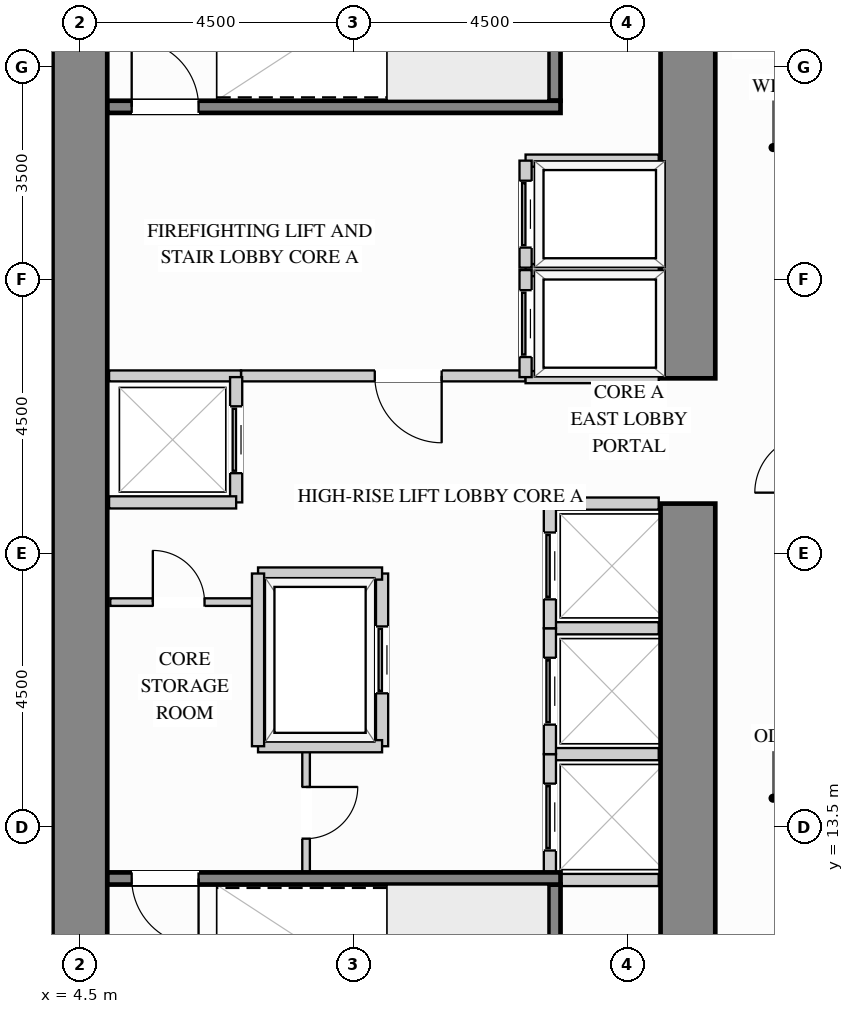
"""IFC4 building model, lengths in metres.
Left out: names, types, materials, properties, quantities, classifications, styles, units other than length and angle.
Written with IfcOpenShell. Run it as: python <this file> out.ifc"""

import sys

from ifc_helpers import new_model, si_unit, direction, frame, frame_2d, origin, place, context, subcontext, project, spatial, rectangle, extrude, source, transform, mapped, element, fill, save


model = new_model("IFC4")
c1 = context("Model", 3, precision=1e-05, world=origin(), true_north=direction((0.0, 1.0)))
c2 = subcontext(c1, "Body", "Model", "MODEL_VIEW")
j1 = project(units=[si_unit("LENGTHUNIT", "METRE"), si_unit("PLANEANGLEUNIT", "RADIAN")], contexts=[c1])
p1 = place(None, origin())
s1 = spatial("IfcSite", under=j1, at=p1, CompositionType="ELEMENT")
p2 = place(p1, origin())
s2 = spatial("IfcBuilding", under=s1, at=p2, CompositionType="ELEMENT")
p3 = place(p2, frame((0.0, 0.0, 51.3)))
s3 = spatial("IfcBuildingStorey", under=s2, at=p3, CompositionType="ELEMENT", Elevation=51.3)
m1 = source(origin(), c2, "Body", "SweptSolid", [
    extrude(rectangle(XDim=9.87, YDim=0.9, at=frame_2d((4.935, 0.0))), origin(), (0.0, 0.0, 1.0), 3.38),
])
p4 = place(p3, frame((14.5, 8.95, 0.0), z_axis=(0.0, 0.0, 1.0), x_axis=(0.0, 1.0, 0.0)))
e1 = element("IfcWall", 1, at=p4, inside=s3, PredefinedType="SHEAR", context=c2, shape_type="MappedRepresentation", body=[
    mapped(m1, transform((0.0, 0.0, 0.0), x_axis=(1.0, 0.0, 0.0), y_axis=(0.0, 1.0, 0.0), z_axis=(0.0, 0.0, 1.0))),
])
m2 = source(origin(), c2, "Body", "SweptSolid", [
    extrude(rectangle(XDim=8.17, YDim=0.9, at=frame_2d((4.085, 0.0))), origin(), (0.0, 0.0, 1.0), 3.38),
])
p5 = place(p3, frame((14.5, 20.88, 0.0), z_axis=(0.0, 0.0, 1.0), x_axis=(0.0, 1.0, 0.0)))
e2 = element("IfcWall", 2, at=p5, inside=s3, PredefinedType="SHEAR", context=c2, shape_type="MappedRepresentation", body=[
    mapped(m2, transform((0.0, 0.0, 0.0), x_axis=(1.0, 0.0, 0.0), y_axis=(0.0, 1.0, 0.0), z_axis=(0.0, 0.0, 1.0))),
])
m3 = source(origin(), c2, "Body", "SweptSolid", [
    extrude(rectangle(XDim=20.1, YDim=0.9, at=frame_2d((10.05, 0.0))), origin(), (0.0, 0.0, 1.0), 3.38),
])
p6 = place(p3, frame((4.5, 8.95, 0.0), z_axis=(0.0, 0.0, 1.0), x_axis=(0.0, 1.0, 0.0)))
e3 = element("IfcWall", 3, at=p6, inside=s3, PredefinedType="SHEAR", context=c2, shape_type="MappedRepresentation", body=[
    mapped(m3, transform((0.0, 0.0, 0.0), x_axis=(1.0, 0.0, 0.0), y_axis=(0.0, 1.0, 0.0), z_axis=(0.0, 0.0, 1.0))),
])
p7 = place(p3, frame((7.15, 20.92, 0.0), z_axis=(0.0, 0.0, 1.0), x_axis=(1.0, 0.0, 0.0)))
e4 = element("IfcWall", 4, at=p7, inside=s3, PredefinedType="PARTITIONING", context=c2, shape_type="SweptSolid", body=[
    extrude(rectangle(XDim=4.68, YDim=0.18, at=frame_2d((2.34, 0.0))), origin(), (0.0, 0.0, 1.0), 3.365),
])
p8 = place(p7, frame((2.2, 0.0, 0.0)))
e5 = element("IfcOpeningElement", 5, at=p8, cuts=e4, PredefinedType="OPENING", context=c2, shape_type="SweptSolid", body=[
    extrude(rectangle(XDim=1.1, YDim=2.15, at=frame_2d((0.55, 1.075))), frame((0.0, 0.1, 0.0), z_axis=(0.0, -1.0, 0.0), x_axis=(1.0, 0.0, 0.0)), (0.0, 0.0, 1.0), 0.2),
])
m4 = source(origin(), c2, "Body", "SweptSolid", [
    extrude(rectangle(XDim=2.17, YDim=0.18, at=frame_2d((1.085, 0.0))), origin(), (0.0, 0.0, 1.0), 3.365),
])
p9 = place(p3, frame((4.98, 20.92, 0.0), z_axis=(0.0, 0.0, 1.0), x_axis=(1.0, 0.0, 0.0)))
e6 = element("IfcWall", 6, at=p9, inside=s3, PredefinedType="PARTITIONING", context=c2, shape_type="MappedRepresentation", body=[
    mapped(m4, transform((0.0, 0.0, 0.0), x_axis=(1.0, 0.0, 0.0), y_axis=(0.0, 1.0, 0.0), z_axis=(0.0, 0.0, 1.0))),
])
p10 = place(p3, frame((8.22, 12.75, 0.0), z_axis=(0.0, 0.0, 1.0), x_axis=(0.0, 1.0, 0.0)))
e7 = element("IfcWall", 7, at=p10, inside=s3, PredefinedType="PARTITIONING", context=c2, shape_type="SweptSolid", body=[
    extrude(rectangle(XDim=2.07, YDim=0.125, at=frame_2d((1.035, 0.0))), origin(), (0.0, 0.0, 1.0), 3.365),
])
p11 = place(p10, frame((0.56, 0.0, 0.0)))
e8 = element("IfcOpeningElement", 8, at=p11, cuts=e7, PredefinedType="OPENING", context=c2, shape_type="SweptSolid", body=[
    extrude(rectangle(XDim=0.85, YDim=2.1, at=frame_2d((0.425, 1.05))), frame((0.0, 0.073, 0.0), z_axis=(0.0, -1.0, 0.0), x_axis=(1.0, 0.0, 0.0)), (0.0, 0.0, 1.0), 0.145),
])
p12 = place(p3, frame((5.0, 17.2, 0.0), z_axis=(0.0, 0.0, 1.0), x_axis=(1.0, 0.0, 0.0)))
e9 = element("IfcWall", 9, at=p12, inside=s3, PredefinedType="PARTITIONING", context=c2, shape_type="SweptSolid", body=[
    extrude(rectangle(XDim=2.4, YDim=0.125, at=frame_2d((1.2, 0.0))), origin(), (0.0, 0.0, 1.0), 3.365),
])
p13 = place(p12, frame((0.7, 0.0, 0.0)))
e10 = element("IfcOpeningElement", 10, at=p13, cuts=e9, PredefinedType="OPENING", context=c2, shape_type="SweptSolid", body=[
    extrude(rectangle(XDim=0.85, YDim=2.1, at=frame_2d((0.425, 1.05))), frame((0.0, 0.073, 0.0), z_axis=(0.0, -1.0, 0.0), x_axis=(1.0, 0.0, 0.0)), (0.0, 0.0, 1.0), 0.145),
])
m5 = source(origin(), c2, "Body", "SweptSolid", [
    extrude(rectangle(XDim=2.19, YDim=0.2, at=frame_2d((1.095, 0.0))), origin(), (0.0, 0.0, 1.0), 3.365),
])
for number, where, z_axis, x_axis in (
    (11, (11.83, 22.66, 0.0), (0.0, 0.0, 1.0), (1.0, 0.0, 0.0)),
    (12, (11.83, 20.9, 0.0), (0.0, 0.0, 1.0), (1.0, 0.0, 0.0)),
):
    element("IfcWall", number, at=place(p3, frame(where, z_axis=z_axis, x_axis=x_axis)), inside=s3, PredefinedType="PARTITIONING", context=c2, shape_type="MappedRepresentation", body=[
        mapped(m5, transform((0.0, 0.0, 0.0), x_axis=(1.0, 0.0, 0.0), y_axis=(0.0, 1.0, 0.0), z_axis=(0.0, 0.0, 1.0))),
    ])
p14 = place(p3, frame((11.83, 20.9, 0.0), z_axis=(0.0, 0.0, 1.0), x_axis=(0.0, 1.0, 0.0)))
e13 = element("IfcWall", 13, at=p14, inside=s3, PredefinedType="PARTITIONING", context=c2, shape_type="SweptSolid", body=[
    extrude(rectangle(XDim=1.76, YDim=0.2, at=frame_2d((0.88, 0.0))), origin(), (0.0, 0.0, 1.0), 3.365),
])
p15 = place(p14, frame((0.33, 0.0, 0.0)))
e14 = element("IfcOpeningElement", 14, at=p15, cuts=e13, PredefinedType="OPENING", context=c2, shape_type="SweptSolid", body=[
    extrude(rectangle(XDim=1.1, YDim=2.2, at=frame_2d((0.55, 1.1))), frame((0.0, 0.11, 0.0), z_axis=(0.0, -1.0, 0.0), x_axis=(1.0, 0.0, 0.0)), (0.0, 0.0, 1.0), 0.22),
])
p16 = place(p3, frame((11.83, 24.46, 0.0), z_axis=(0.0, 0.0, 1.0), x_axis=(1.0, 0.0, 0.0)))
e15 = element("IfcWall", 15, at=p16, inside=s3, PredefinedType="PARTITIONING", context=c2, shape_type="MappedRepresentation", body=[
    mapped(m5, transform((0.0, 0.0, 0.0), x_axis=(1.0, 0.0, 0.0), y_axis=(0.0, 1.0, 0.0), z_axis=(0.0, 0.0, 1.0))),
])
p17 = place(p3, frame((11.83, 22.7, 0.0), z_axis=(0.0, 0.0, 1.0), x_axis=(0.0, 1.0, 0.0)))
e16 = element("IfcWall", 16, at=p17, inside=s3, PredefinedType="PARTITIONING", context=c2, shape_type="SweptSolid", body=[
    extrude(rectangle(XDim=1.76, YDim=0.2, at=frame_2d((0.88, 0.0))), origin(), (0.0, 0.0, 1.0), 3.365),
])
p18 = place(p17, frame((0.33, 0.0, 0.0)))
e17 = element("IfcOpeningElement", 17, at=p18, cuts=e16, PredefinedType="OPENING", context=c2, shape_type="SweptSolid", body=[
    extrude(rectangle(XDim=1.1, YDim=2.2, at=frame_2d((0.55, 1.1))), frame((0.0, 0.11, 0.0), z_axis=(0.0, -1.0, 0.0), x_axis=(1.0, 0.0, 0.0)), (0.0, 0.0, 1.0), 0.22),
])
m6 = source(origin(), c2, "Body", "SweptSolid", [
    extrude(rectangle(XDim=1.79, YDim=0.2, at=frame_2d((0.895, 0.0))), origin(), (0.0, 0.0, 1.0), 3.365),
])
for number, where, z_axis, x_axis in (
    (18, (12.23, 14.7, 0.0), (0.0, 0.0, 1.0), (1.0, 0.0, 0.0)),
    (19, (12.23, 12.63, 0.0), (0.0, 0.0, 1.0), (1.0, 0.0, 0.0)),
):
    element("IfcWall", number, at=place(p3, frame(where, z_axis=z_axis, x_axis=x_axis)), inside=s3, PredefinedType="PARTITIONING", context=c2, shape_type="MappedRepresentation", body=[
        mapped(m6, transform((0.0, 0.0, 0.0), x_axis=(1.0, 0.0, 0.0), y_axis=(0.0, 1.0, 0.0), z_axis=(0.0, 0.0, 1.0))),
    ])
p19 = place(p3, frame((12.23, 12.63, 0.0), z_axis=(0.0, 0.0, 1.0), x_axis=(0.0, 1.0, 0.0)))
e20 = element("IfcWall", 20, at=p19, inside=s3, PredefinedType="PARTITIONING", context=c2, shape_type="SweptSolid", body=[
    extrude(rectangle(XDim=2.07, YDim=0.2, at=frame_2d((1.035, 0.0))), origin(), (0.0, 0.0, 1.0), 3.365),
])
p20 = place(p19, frame((0.485, 0.0, 0.0)))
e21 = element("IfcOpeningElement", 21, at=p20, cuts=e20, PredefinedType="OPENING", context=c2, shape_type="SweptSolid", body=[
    extrude(rectangle(XDim=1.1, YDim=2.2, at=frame_2d((0.55, 1.1))), frame((0.0, 0.11, 0.0), z_axis=(0.0, -1.0, 0.0), x_axis=(1.0, 0.0, 0.0)), (0.0, 0.0, 1.0), 0.22),
])
p21 = place(p3, frame((12.23, 16.77, 0.0), z_axis=(0.0, 0.0, 1.0), x_axis=(1.0, 0.0, 0.0)))
e22 = element("IfcWall", 22, at=p21, inside=s3, PredefinedType="PARTITIONING", context=c2, shape_type="MappedRepresentation", body=[
    mapped(m6, transform((0.0, 0.0, 0.0), x_axis=(1.0, 0.0, 0.0), y_axis=(0.0, 1.0, 0.0), z_axis=(0.0, 0.0, 1.0))),
])
p22 = place(p3, frame((12.23, 14.7, 0.0), z_axis=(0.0, 0.0, 1.0), x_axis=(0.0, 1.0, 0.0)))
e23 = element("IfcWall", 23, at=p22, inside=s3, PredefinedType="PARTITIONING", context=c2, shape_type="SweptSolid", body=[
    extrude(rectangle(XDim=2.07, YDim=0.2, at=frame_2d((1.035, 0.0))), origin(), (0.0, 0.0, 1.0), 3.365),
])
p23 = place(p22, frame((0.485, 0.0, 0.0)))
e24 = element("IfcOpeningElement", 24, at=p23, cuts=e23, PredefinedType="OPENING", context=c2, shape_type="SweptSolid", body=[
    extrude(rectangle(XDim=1.1, YDim=2.2, at=frame_2d((0.55, 1.1))), frame((0.0, 0.11, 0.0), z_axis=(0.0, -1.0, 0.0), x_axis=(1.0, 0.0, 0.0)), (0.0, 0.0, 1.0), 0.22),
])
p24 = place(p3, frame((12.23, 18.82, 0.0), z_axis=(0.0, 0.0, 1.0), x_axis=(1.0, 0.0, 0.0)))
e25 = element("IfcWall", 25, at=p24, inside=s3, PredefinedType="PARTITIONING", context=c2, shape_type="MappedRepresentation", body=[
    mapped(m6, transform((0.0, 0.0, 0.0), x_axis=(1.0, 0.0, 0.0), y_axis=(0.0, 1.0, 0.0), z_axis=(0.0, 0.0, 1.0))),
])
p25 = place(p3, frame((12.23, 16.77, 0.0), z_axis=(0.0, 0.0, 1.0), x_axis=(0.0, 1.0, 0.0)))
e26 = element("IfcWall", 26, at=p25, inside=s3, PredefinedType="PARTITIONING", context=c2, shape_type="SweptSolid", body=[
    extrude(rectangle(XDim=2.05, YDim=0.2, at=frame_2d((1.025, 0.0))), origin(), (0.0, 0.0, 1.0), 3.365),
])
p26 = place(p25, frame((0.475, 0.0, 0.0)))
e27 = element("IfcOpeningElement", 27, at=p26, cuts=e26, PredefinedType="OPENING", context=c2, shape_type="SweptSolid", body=[
    extrude(rectangle(XDim=1.1, YDim=2.2, at=frame_2d((0.55, 1.1))), frame((0.0, 0.11, 0.0), z_axis=(0.0, -1.0, 0.0), x_axis=(1.0, 0.0, 0.0)), (0.0, 0.0, 1.0), 0.22),
])
p27 = place(p3, frame((7.07, 18.84, 0.0), z_axis=(0.0, 0.0, 1.0), x_axis=(0.0, 1.0, 0.0)))
e28 = element("IfcWall", 28, at=p27, inside=s3, PredefinedType="PARTITIONING", context=c2, shape_type="SweptSolid", body=[
    extrude(rectangle(XDim=2.06, YDim=0.2, at=frame_2d((1.03, 0.0))), origin(), (0.0, 0.0, 1.0), 3.365),
])
p28 = place(p27, frame((0.48, 0.0, 0.0)))
e29 = element("IfcOpeningElement", 29, at=p28, cuts=e28, PredefinedType="OPENING", context=c2, shape_type="SweptSolid", body=[
    extrude(rectangle(XDim=1.1, YDim=2.2, at=frame_2d((0.55, 1.1))), frame((0.0, 0.11, 0.0), z_axis=(0.0, -1.0, 0.0), x_axis=(1.0, 0.0, 0.0)), (0.0, 0.0, 1.0), 0.22),
])
m7 = source(origin(), c2, "Body", "SweptSolid", [
    extrude(rectangle(XDim=2.09, YDim=0.2, at=frame_2d((1.045, 0.0))), origin(), (0.0, 0.0, 1.0), 3.365),
])
p29 = place(p3, frame((4.98, 18.84, 0.0), z_axis=(0.0, 0.0, 1.0), x_axis=(1.0, 0.0, 0.0)))
e30 = element("IfcWall", 30, at=p29, inside=s3, PredefinedType="PARTITIONING", context=c2, shape_type="MappedRepresentation", body=[
    mapped(m7, transform((0.0, 0.0, 0.0), x_axis=(1.0, 0.0, 0.0), y_axis=(0.0, 1.0, 0.0), z_axis=(0.0, 0.0, 1.0))),
])
p30 = place(p3, frame((9.47, 14.83, 0.0), z_axis=(0.0, 0.0, 1.0), x_axis=(0.0, 1.0, 0.0)))
e31 = element("IfcWall", 31, at=p30, inside=s3, PredefinedType="PARTITIONING", context=c2, shape_type="SweptSolid", body=[
    extrude(rectangle(XDim=2.84, YDim=0.2, at=frame_2d((1.42, 0.0))), origin(), (0.0, 0.0, 1.0), 3.365),
])
p31 = place(p30, frame((0.87, 0.0, 0.0)))
e32 = element("IfcOpeningElement", 32, at=p31, cuts=e31, PredefinedType="OPENING", context=c2, shape_type="SweptSolid", body=[
    extrude(rectangle(XDim=1.1, YDim=2.2, at=frame_2d((0.55, 1.1))), frame((0.0, 0.11, 0.0), z_axis=(0.0, -1.0, 0.0), x_axis=(1.0, 0.0, 0.0)), (0.0, 0.0, 1.0), 0.22),
])
m8 = source(origin(), c2, "Body", "SweptSolid", [
    extrude(rectangle(XDim=2.04, YDim=0.2, at=frame_2d((1.02, 0.0))), origin(), (0.0, 0.0, 1.0), 3.365),
])
for number, where, z_axis, x_axis in (
    (33, (7.43, 17.67, 0.0), (0.0, 0.0, 1.0), (1.0, 0.0, 0.0)),
    (34, (7.43, 14.83, 0.0), (0.0, 0.0, 1.0), (1.0, 0.0, 0.0)),
):
    element("IfcWall", number, at=place(p3, frame(where, z_axis=z_axis, x_axis=x_axis)), inside=s3, PredefinedType="PARTITIONING", context=c2, shape_type="MappedRepresentation", body=[
        mapped(m8, transform((0.0, 0.0, 0.0), x_axis=(1.0, 0.0, 0.0), y_axis=(0.0, 1.0, 0.0), z_axis=(0.0, 0.0, 1.0))),
    ])
m9 = source(origin(), c2, "Body", "SweptSolid", [
    extrude(rectangle(XDim=2.84, YDim=0.2, at=frame_2d((1.42, 0.0))), origin(), (0.0, 0.0, 1.0), 3.365),
])
p32 = place(p3, frame((7.43, 14.83, 0.0), z_axis=(0.0, 0.0, 1.0), x_axis=(0.0, 1.0, 0.0)))
e35 = element("IfcWall", 35, at=p32, inside=s3, PredefinedType="PARTITIONING", context=c2, shape_type="MappedRepresentation", body=[
    mapped(m9, transform((0.0, 0.0, 0.0), x_axis=(1.0, 0.0, 0.0), y_axis=(0.0, 1.0, 0.0), z_axis=(0.0, 0.0, 1.0))),
])
m10 = source(origin(), c2, "Body", "SweptSolid", [
    extrude(rectangle(XDim=3.603, YDim=0.2, at=frame_2d((1.802, 0.0))), origin(), (0.0, 0.0, 1.0), 3.38),
])
p33 = place(p3, frame((12.305, 8.952, 0.0), z_axis=(0.0, 0.0, 1.0), x_axis=(0.0, 1.0, 0.0)))
e36 = element("IfcWall", 36, at=p33, inside=s3, PredefinedType="SHEAR", context=c2, shape_type="MappedRepresentation", body=[
    mapped(m10, transform((0.0, 0.0, 0.0), x_axis=(1.0, 0.0, 0.0), y_axis=(0.0, 1.0, 0.0), z_axis=(0.0, 0.0, 1.0))),
])
p34 = place(p3, frame((4.952, 12.655, 0.0), z_axis=(0.0, 0.0, 1.0), x_axis=(1.0, 0.0, 0.0)))
e37 = element("IfcWall", 37, at=p34, inside=s3, PredefinedType="SHEAR", context=c2, shape_type="SweptSolid", body=[
    extrude(rectangle(XDim=7.453, YDim=0.2, at=frame_2d((3.727, 0.0))), origin(), (0.0, 0.0, 1.0), 3.38),
])
p35 = place(p34, frame((0.4, 0.0, 0.0)))
e38 = element("IfcOpeningElement", 38, at=p35, cuts=e37, PredefinedType="OPENING", context=c2, shape_type="SweptSolid", body=[
    extrude(rectangle(XDim=1.1, YDim=2.15, at=frame_2d((0.55, 1.075))), frame((0.0, 0.11, 0.0), z_axis=(0.0, -1.0, 0.0), x_axis=(1.0, 0.0, 0.0)), (0.0, 0.0, 1.0), 0.22),
])
p36 = place(p3, frame((12.305, 25.445, 0.0), z_axis=(0.0, 0.0, 1.0), x_axis=(0.0, 1.0, 0.0)))
e39 = element("IfcWall", 39, at=p36, inside=s3, PredefinedType="SHEAR", context=c2, shape_type="MappedRepresentation", body=[
    mapped(m10, transform((0.0, 0.0, 0.0), x_axis=(1.0, 0.0, 0.0), y_axis=(0.0, 1.0, 0.0), z_axis=(0.0, 0.0, 1.0))),
])
p37 = place(p3, frame((4.952, 25.345, 0.0), z_axis=(0.0, 0.0, 1.0), x_axis=(1.0, 0.0, 0.0)))
e40 = element("IfcWall", 40, at=p37, inside=s3, PredefinedType="SHEAR", context=c2, shape_type="SweptSolid", body=[
    extrude(rectangle(XDim=7.453, YDim=0.2, at=frame_2d((3.727, 0.0))), origin(), (0.0, 0.0, 1.0), 3.38),
])
p38 = place(p37, frame((0.4, 0.0, 0.0)))
e41 = element("IfcOpeningElement", 41, at=p38, cuts=e40, PredefinedType="OPENING", context=c2, shape_type="SweptSolid", body=[
    extrude(rectangle(XDim=1.1, YDim=2.15, at=frame_2d((0.55, 1.075))), frame((0.0, 0.11, 0.0), z_axis=(0.0, -1.0, 0.0), x_axis=(1.0, 0.0, 0.0)), (0.0, 0.0, 1.0), 0.22),
])
m11 = source(origin(), c2, "Body", "SweptSolid", [
    extrude(rectangle(XDim=1.1, YDim=2.15, at=frame_2d((0.55, 1.075))), frame((0.0, 0.025, 0.0), z_axis=(0.0, -1.0, 0.0), x_axis=(1.0, 0.0, 0.0)), (0.0, 0.0, 1.0), 0.05),
])
p39 = place(p8, origin())
e42 = element("IfcDoor", 42, at=p39, inside=s3, OperationType="SINGLE_SWING_RIGHT", PredefinedType="DOOR", context=c2, shape_type="MappedRepresentation", body=[
    mapped(m11, transform((0.0, 0.0, 0.0), x_axis=(1.0, 0.0, 0.0), y_axis=(0.0, 1.0, 0.0), z_axis=(0.0, 0.0, 1.0))),
])
fill(e5, e42)
m12 = source(origin(), c2, "Body", "SweptSolid", [
    extrude(rectangle(XDim=1.1, YDim=2.2, at=frame_2d((0.55, 1.1))), frame((0.0, 0.025, 0.0), z_axis=(0.0, -1.0, 0.0), x_axis=(1.0, 0.0, 0.0)), (0.0, 0.0, 1.0), 0.05),
])
p40 = place(p15, origin())
e43 = element("IfcDoor", 43, at=p40, inside=s3, OperationType="SLIDING_TO_LEFT", PredefinedType="DOOR", context=c2, shape_type="MappedRepresentation", body=[
    mapped(m12, transform((0.0, 0.0, 0.0), x_axis=(1.0, 0.0, 0.0), y_axis=(0.0, 1.0, 0.0), z_axis=(0.0, 0.0, 1.0))),
])
fill(e14, e43)
p41 = place(p18, origin())
e44 = element("IfcDoor", 44, at=p41, inside=s3, OperationType="SLIDING_TO_LEFT", PredefinedType="DOOR", context=c2, shape_type="MappedRepresentation", body=[
    mapped(m12, transform((0.0, 0.0, 0.0), x_axis=(1.0, 0.0, 0.0), y_axis=(0.0, 1.0, 0.0), z_axis=(0.0, 0.0, 1.0))),
])
fill(e17, e44)
p42 = place(p20, origin())
e45 = element("IfcDoor", 45, at=p42, inside=s3, OperationType="SLIDING_TO_LEFT", PredefinedType="DOOR", context=c2, shape_type="MappedRepresentation", body=[
    mapped(m12, transform((0.0, 0.0, 0.0), x_axis=(1.0, 0.0, 0.0), y_axis=(0.0, 1.0, 0.0), z_axis=(0.0, 0.0, 1.0))),
])
fill(e21, e45)
p43 = place(p23, origin())
e46 = element("IfcDoor", 46, at=p43, inside=s3, OperationType="SLIDING_TO_LEFT", PredefinedType="DOOR", context=c2, shape_type="MappedRepresentation", body=[
    mapped(m12, transform((0.0, 0.0, 0.0), x_axis=(1.0, 0.0, 0.0), y_axis=(0.0, 1.0, 0.0), z_axis=(0.0, 0.0, 1.0))),
])
fill(e24, e46)
p44 = place(p26, origin())
e47 = element("IfcDoor", 47, at=p44, inside=s3, OperationType="SLIDING_TO_LEFT", PredefinedType="DOOR", context=c2, shape_type="MappedRepresentation", body=[
    mapped(m12, transform((0.0, 0.0, 0.0), x_axis=(1.0, 0.0, 0.0), y_axis=(0.0, 1.0, 0.0), z_axis=(0.0, 0.0, 1.0))),
])
fill(e27, e47)
p45 = place(p28, origin())
e48 = element("IfcDoor", 48, at=p45, inside=s3, OperationType="SLIDING_TO_LEFT", PredefinedType="DOOR", context=c2, shape_type="MappedRepresentation", body=[
    mapped(m12, transform((0.0, 0.0, 0.0), x_axis=(1.0, 0.0, 0.0), y_axis=(0.0, 1.0, 0.0), z_axis=(0.0, 0.0, 1.0))),
])
fill(e29, e48)
p46 = place(p31, origin())
e49 = element("IfcDoor", 49, at=p46, inside=s3, OperationType="SLIDING_TO_LEFT", PredefinedType="DOOR", context=c2, shape_type="MappedRepresentation", body=[
    mapped(m12, transform((0.0, 0.0, 0.0), x_axis=(1.0, 0.0, 0.0), y_axis=(0.0, 1.0, 0.0), z_axis=(0.0, 0.0, 1.0))),
])
fill(e32, e49)
m13 = source(origin(), c2, "Body", "SweptSolid", [
    extrude(rectangle(XDim=0.85, YDim=2.1, at=frame_2d((0.425, 1.05))), frame((0.0, 0.025, 0.0), z_axis=(0.0, -1.0, 0.0), x_axis=(1.0, 0.0, 0.0)), (0.0, 0.0, 1.0), 0.05),
])
p47 = place(p13, origin())
e50 = element("IfcDoor", 50, at=p47, inside=s3, OperationType="SINGLE_SWING_LEFT", PredefinedType="DOOR", context=c2, shape_type="MappedRepresentation", body=[
    mapped(m13, transform((0.0, 0.0, 0.0), x_axis=(1.0, 0.0, 0.0), y_axis=(0.0, 1.0, 0.0), z_axis=(0.0, 0.0, 1.0))),
])
fill(e10, e50)
p48 = place(p11, origin())
e51 = element("IfcDoor", 51, at=p48, inside=s3, OperationType="SINGLE_SWING_RIGHT", PredefinedType="DOOR", context=c2, shape_type="MappedRepresentation", body=[
    mapped(m13, transform((0.0, 0.0, 0.0), x_axis=(1.0, 0.0, 0.0), y_axis=(0.0, 1.0, 0.0), z_axis=(0.0, 0.0, 1.0))),
])
fill(e8, e51)
m14 = source(origin(), c2, "Body", "SweptSolid", [
    extrude(rectangle(XDim=1.1, YDim=2.15, at=frame_2d((0.55, 1.075))), frame((0.0, 0.025, 0.0), z_axis=(0.0, -1.0, 0.0), x_axis=(1.0, 0.0, 0.0)), (0.0, 0.0, 1.0), 0.05),
])
p49 = place(p35, origin())
e52 = element("IfcDoor", 52, at=p49, inside=s3, OperationType="SINGLE_SWING_RIGHT", PredefinedType="DOOR", context=c2, shape_type="MappedRepresentation", body=[
    mapped(m14, transform((0.0, 0.0, 0.0), x_axis=(1.0, 0.0, 0.0), y_axis=(0.0, 1.0, 0.0), z_axis=(0.0, 0.0, 1.0))),
])
fill(e38, e52)
p50 = place(p38, origin())
e53 = element("IfcDoor", 53, at=p50, inside=s3, OperationType="SINGLE_SWING_LEFT", PredefinedType="DOOR", context=c2, shape_type="MappedRepresentation", body=[
    mapped(m14, transform((0.0, 0.0, 0.0), x_axis=(1.0, 0.0, 0.0), y_axis=(0.0, 1.0, 0.0), z_axis=(0.0, 0.0, 1.0))),
])
fill(e41, e53)
save(model, sys.argv[1])
